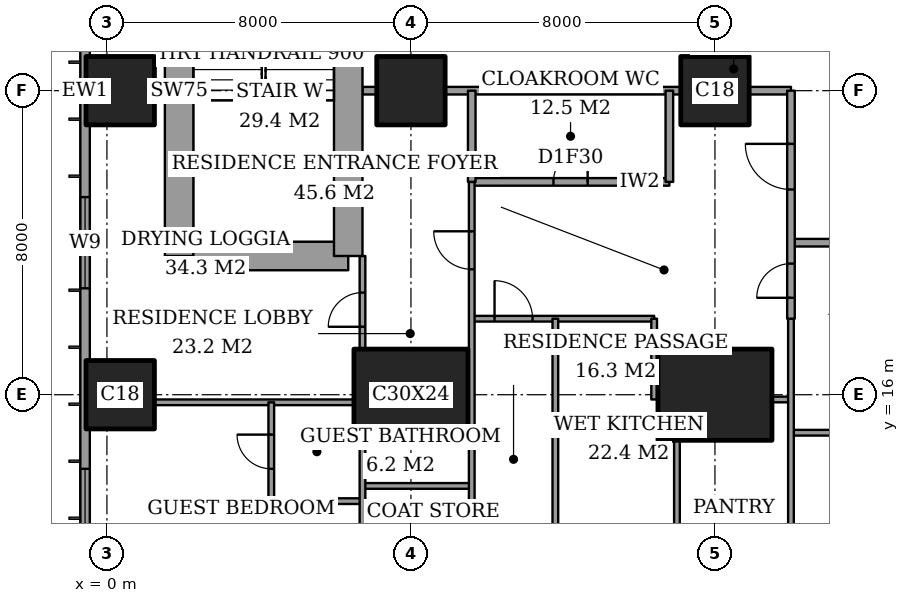
"""IFC4 building model, lengths in metres.
Left out: names, types, materials, properties, quantities, classifications, styles, units other than length and angle.
Written with IfcOpenShell. Run it as: python <this file> out.ifc"""

import sys

from ifc_helpers import new_model, si_unit, direction, frame, frame_2d, origin, origin_2d, place, context, subcontext, project, spatial, rectangle, extrude, element, fill, save


model = new_model("IFC4")
c1 = context("Model", 3, precision=1e-05, world=origin(), true_north=direction((0.0, 1.0)))
c2 = subcontext(c1, "Body", "Model", "MODEL_VIEW")
j1 = project(units=[si_unit("LENGTHUNIT", "METRE"), si_unit("PLANEANGLEUNIT", "RADIAN")], contexts=[c1])
p1 = place(None, origin())
s1 = spatial("IfcSite", under=j1, at=p1, CompositionType="ELEMENT")
p2 = place(p1, origin())
s2 = spatial("IfcBuilding", under=s1, at=p2, CompositionType="ELEMENT")
p3 = place(p2, frame((0.0, 0.0, 193.0)))
s3 = spatial("IfcBuildingStorey", under=s2, at=p3, CompositionType="ELEMENT", Elevation=193.0)
for number, where, z_axis, x_axis in (
    (1, (0.35, 16.0, 0.0), (0.0, 0.0, 1.0), (1.0, 0.0, 0.0)),
    (2, (0.35, 24.0, 0.0), (0.0, 0.0, 1.0), (1.0, 0.0, 0.0)),
):
    element("IfcColumn", number, at=place(p3, frame(where, z_axis=z_axis, x_axis=x_axis)), inside=s3, PredefinedType="COLUMN", context=c2, shape_type="SweptSolid", body=[
        extrude(rectangle(XDim=1.8, YDim=1.8, at=origin_2d()), origin(), (0.0, 0.0, 1.0), 3.6),
    ])
p4 = place(p3, frame((8.0, 16.0, 0.0), z_axis=(0.0, 0.0, 1.0), x_axis=(1.0, 0.0, 0.0)))
e3 = element("IfcColumn", 3, at=p4, inside=s3, PredefinedType="COLUMN", context=c2, shape_type="SweptSolid", body=[
    extrude(rectangle(XDim=3.0, YDim=2.4, at=origin_2d()), origin(), (0.0, 0.0, 1.0), 3.6),
])
p5 = place(p3, frame((8.0, 24.0, 0.0), z_axis=(0.0, 0.0, 1.0), x_axis=(1.0, 0.0, 0.0)))
e4 = element("IfcColumn", 4, at=p5, inside=s3, PredefinedType="COLUMN", context=c2, shape_type="SweptSolid", body=[
    extrude(rectangle(XDim=1.8, YDim=1.8, at=origin_2d()), origin(), (0.0, 0.0, 1.0), 3.6),
])
p6 = place(p3, frame((16.0, 16.0, 0.0), z_axis=(0.0, 0.0, 1.0), x_axis=(1.0, 0.0, 0.0)))
e5 = element("IfcColumn", 5, at=p6, inside=s3, PredefinedType="COLUMN", context=c2, shape_type="SweptSolid", body=[
    extrude(rectangle(XDim=3.0, YDim=2.4, at=origin_2d()), origin(), (0.0, 0.0, 1.0), 3.6),
])
p7 = place(p3, frame((16.0, 24.0, 0.0), z_axis=(0.0, 0.0, 1.0), x_axis=(1.0, 0.0, 0.0)))
e6 = element("IfcColumn", 6, at=p7, inside=s3, PredefinedType="COLUMN", context=c2, shape_type="SweptSolid", body=[
    extrude(rectangle(XDim=1.8, YDim=1.8, at=origin_2d()), origin(), (0.0, 0.0, 1.0), 3.6),
])
p8 = place(p3, frame((1.9, 19.65, 0.0), z_axis=(0.0, 0.0, 1.0), x_axis=(1.0, 0.0, 0.0)))
e7 = element("IfcWall", 7, at=p8, inside=s3, PredefinedType="SHEAR", context=c2, shape_type="SweptSolid", body=[
    extrude(rectangle(XDim=4.45, YDim=0.75, at=frame_2d((2.225, 0.0))), origin(), (0.0, 0.0, 1.0), 3.6),
])
p9 = place(p3, frame((6.35, 19.65, 0.0), z_axis=(0.0, 0.0, 1.0), x_axis=(0.0, 1.0, 0.0)))
e8 = element("IfcWall", 8, at=p9, inside=s3, PredefinedType="SHEAR", context=c2, shape_type="SweptSolid", body=[
    extrude(rectangle(XDim=8.7, YDim=0.75, at=frame_2d((4.35, 0.0))), origin(), (0.0, 0.0, 1.0), 3.6),
])
p10 = place(p9, frame((6.725, 0.0, 0.0)))
e9 = element("IfcOpeningElement", 9, at=p10, cuts=e8, PredefinedType="OPENING", context=c2, shape_type="SweptSolid", body=[
    extrude(rectangle(XDim=1.0, YDim=2.1, at=frame_2d((0.5, 1.05))), frame((0.0, 0.385, 0.0), z_axis=(0.0, -1.0, 0.0), x_axis=(1.0, 0.0, 0.0)), (0.0, 0.0, 1.0), 0.77),
])
p11 = place(p3, frame((1.9, 28.35, 0.0), z_axis=(0.0, 0.0, 1.0), x_axis=(0.0, -1.0, 0.0)))
e10 = element("IfcWall", 10, at=p11, inside=s3, PredefinedType="SHEAR", context=c2, shape_type="SweptSolid", body=[
    extrude(rectangle(XDim=8.7, YDim=0.75, at=frame_2d((4.35, 0.0))), origin(), (0.0, 0.0, 1.0), 3.6),
])
p12 = place(p3, frame((-0.575, 44.825, 0.0), z_axis=(0.0, 0.0, 1.0), x_axis=(0.0, -1.0, 0.0)))
e11 = element("IfcWall", 11, at=p12, inside=s3, PredefinedType="SOLIDWALL", context=c2, shape_type="SweptSolid", body=[
    extrude(rectangle(XDim=41.65, YDim=0.25, at=frame_2d((20.825, 0.0))), origin(), (0.0, 0.0, 1.0), 3.6),
])
p13 = place(p12, frame((0.825, 0.0, 0.2)))
e12 = element("IfcOpeningElement", 12, at=p13, cuts=e11, PredefinedType="OPENING", context=c2, shape_type="SweptSolid", body=[
    extrude(rectangle(XDim=2.4, YDim=2.4, at=frame_2d((1.2, 1.2))), frame((0.0, 0.135, 0.0), z_axis=(0.0, -1.0, 0.0), x_axis=(1.0, 0.0, 0.0)), (0.0, 0.0, 1.0), 0.27),
])
p14 = place(p12, frame((6.05, 0.0, 0.2)))
e13 = element("IfcOpeningElement", 13, at=p14, cuts=e11, PredefinedType="OPENING", context=c2, shape_type="SweptSolid", body=[
    extrude(rectangle(XDim=1.2, YDim=2.4, at=frame_2d((0.6, 1.2))), frame((0.0, 0.135, 0.0), z_axis=(0.0, -1.0, 0.0), x_axis=(1.0, 0.0, 0.0)), (0.0, 0.0, 1.0), 0.27),
])
p15 = place(p12, frame((8.225, 0.0, 0.2)))
e14 = element("IfcOpeningElement", 14, at=p15, cuts=e11, PredefinedType="OPENING", context=c2, shape_type="SweptSolid", body=[
    extrude(rectangle(XDim=2.4, YDim=2.4, at=frame_2d((1.2, 1.2))), frame((0.0, 0.135, 0.0), z_axis=(0.0, -1.0, 0.0), x_axis=(1.0, 0.0, 0.0)), (0.0, 0.0, 1.0), 0.27),
])
p16 = place(p12, frame((15.625, 0.0, 0.2)))
e15 = element("IfcOpeningElement", 15, at=p16, cuts=e11, PredefinedType="OPENING", context=c2, shape_type="SweptSolid", body=[
    extrude(rectangle(XDim=2.4, YDim=2.4, at=frame_2d((1.2, 1.2))), frame((0.0, 0.135, 0.0), z_axis=(0.0, -1.0, 0.0), x_axis=(1.0, 0.0, 0.0)), (0.0, 0.0, 1.0), 0.27),
])
p17 = place(p12, frame((23.625, 0.0, 0.2)))
e16 = element("IfcOpeningElement", 16, at=p17, cuts=e11, PredefinedType="OPENING", context=c2, shape_type="SweptSolid", body=[
    extrude(rectangle(XDim=2.4, YDim=2.4, at=frame_2d((1.2, 1.2))), frame((0.0, 0.135, 0.0), z_axis=(0.0, -1.0, 0.0), x_axis=(1.0, 0.0, 0.0)), (0.0, 0.0, 1.0), 0.27),
])
p18 = place(p12, frame((30.775, 0.0, 0.2)))
e17 = element("IfcOpeningElement", 17, at=p18, cuts=e11, PredefinedType="OPENING", context=c2, shape_type="SweptSolid", body=[
    extrude(rectangle(XDim=2.4, YDim=2.4, at=frame_2d((1.2, 1.2))), frame((0.0, 0.135, 0.0), z_axis=(0.0, -1.0, 0.0), x_axis=(1.0, 0.0, 0.0)), (0.0, 0.0, 1.0), 0.27),
])
p19 = place(p12, frame((34.55, 0.0, 0.2)))
e18 = element("IfcOpeningElement", 18, at=p19, cuts=e11, PredefinedType="OPENING", context=c2, shape_type="SweptSolid", body=[
    extrude(rectangle(XDim=1.2, YDim=2.4, at=frame_2d((0.6, 1.2))), frame((0.0, 0.135, 0.0), z_axis=(0.0, -1.0, 0.0), x_axis=(1.0, 0.0, 0.0)), (0.0, 0.0, 1.0), 0.27),
])
p20 = place(p12, frame((38.425, 0.0, 0.2)))
e19 = element("IfcOpeningElement", 19, at=p20, cuts=e11, PredefinedType="OPENING", context=c2, shape_type="SweptSolid", body=[
    extrude(rectangle(XDim=2.4, YDim=2.4, at=frame_2d((1.2, 1.2))), frame((0.0, 0.135, 0.0), z_axis=(0.0, -1.0, 0.0), x_axis=(1.0, 0.0, 0.0)), (0.0, 0.0, 1.0), 0.27),
])
p21 = place(p3, frame((4.325, 13.2, 0.0), z_axis=(0.0, 0.0, 1.0), x_axis=(1.0, 0.0, 0.0)))
e20 = element("IfcWall", 20, at=p21, inside=s3, PredefinedType="PARTITIONING", context=c2, shape_type="SweptSolid", body=[
    extrude(rectangle(XDim=2.4, YDim=0.15, at=frame_2d((1.2, 0.0))), origin(), (0.0, 0.0, 1.0), 3.35),
])
p22 = place(p3, frame((6.725, 13.6, 0.0), z_axis=(0.0, 0.0, 1.0), x_axis=(1.0, 0.0, 0.0)))
e21 = element("IfcWall", 21, at=p22, inside=s3, PredefinedType="PARTITIONING", context=c2, shape_type="SweptSolid", body=[
    extrude(rectangle(XDim=2.875, YDim=0.15, at=frame_2d((1.438, 0.0))), origin(), (0.0, 0.0, 1.0), 3.35),
])
p23 = place(p3, frame((18.0, 15.0, 0.0), z_axis=(0.0, 0.0, 1.0), x_axis=(1.0, 0.0, 0.0)))
e22 = element("IfcWall", 22, at=p23, inside=s3, PredefinedType="PARTITIONING", context=c2, shape_type="SweptSolid", body=[
    extrude(rectangle(XDim=6.0, YDim=0.15, at=frame_2d((3.0, 0.0))), origin(), (0.0, 0.0, 1.0), 3.35),
])
p24 = place(p3, frame((1.25, 15.8, 0.0), z_axis=(0.0, 0.0, 1.0), x_axis=(1.0, 0.0, 0.0)))
e23 = element("IfcWall", 23, at=p24, inside=s3, PredefinedType="PARTITIONING", context=c2, shape_type="SweptSolid", body=[
    extrude(rectangle(XDim=5.25, YDim=0.15, at=frame_2d((2.625, 0.0))), origin(), (0.0, 0.0, 1.0), 3.35),
])
p25 = place(p3, frame((17.5, 15.875, 0.0), z_axis=(0.0, 0.0, 1.0), x_axis=(1.0, 0.0, 0.0)))
e24 = element("IfcWall", 24, at=p25, inside=s3, PredefinedType="PARTITIONING", context=c2, shape_type="SweptSolid", body=[
    extrude(rectangle(XDim=0.5, YDim=0.15, at=frame_2d((0.25, 0.0))), origin(), (0.0, 0.0, 1.0), 2.634),
])
p26 = place(p3, frame((9.6, 18.0, 0.0), z_axis=(0.0, 0.0, 1.0), x_axis=(1.0, 0.0, 0.0)))
e25 = element("IfcWall", 25, at=p26, inside=s3, PredefinedType="PARTITIONING", context=c2, shape_type="SweptSolid", body=[
    extrude(rectangle(XDim=4.8, YDim=0.15, at=frame_2d((2.4, 0.0))), origin(), (0.0, 0.0, 1.0), 3.35),
])
p27 = place(p26, frame((0.6, 0.0, 0.0)))
e26 = element("IfcOpeningElement", 26, at=p27, cuts=e25, PredefinedType="OPENING", context=c2, shape_type="SweptSolid", body=[
    extrude(rectangle(XDim=1.0, YDim=2.1, at=frame_2d((0.5, 1.05))), frame((0.0, 0.085, 0.0), z_axis=(0.0, -1.0, 0.0), x_axis=(1.0, 0.0, 0.0)), (0.0, 0.0, 1.0), 0.17),
])
p28 = place(p3, frame((18.0, 20.0, 0.0), z_axis=(0.0, 0.0, 1.0), x_axis=(1.0, 0.0, 0.0)))
e27 = element("IfcWall", 27, at=p28, inside=s3, PredefinedType="PARTITIONING", context=c2, shape_type="SweptSolid", body=[
    extrude(rectangle(XDim=6.0, YDim=0.2, at=frame_2d((3.0, 0.0))), origin(), (0.0, 0.0, 1.0), 3.35),
])
p29 = place(p3, frame((9.6, 21.6, 0.0), z_axis=(0.0, 0.0, 1.0), x_axis=(1.0, 0.0, 0.0)))
e28 = element("IfcWall", 28, at=p29, inside=s3, PredefinedType="PARTITIONING", context=c2, shape_type="SweptSolid", body=[
    extrude(rectangle(XDim=5.2, YDim=0.2, at=frame_2d((2.6, 0.0))), origin(), (0.0, 0.0, 1.0), 3.35),
])
p30 = place(p29, frame((2.15, 0.0, 0.0)))
e29 = element("IfcOpeningElement", 29, at=p30, cuts=e28, PredefinedType="OPENING", context=c2, shape_type="SweptSolid", body=[
    extrude(rectangle(XDim=0.9, YDim=2.1, at=frame_2d((0.45, 1.05))), frame((0.0, 0.11, 0.0), z_axis=(0.0, -1.0, 0.0), x_axis=(1.0, 0.0, 0.0)), (0.0, 0.0, 1.0), 0.22),
])
p31 = place(p3, frame((6.725, 24.0, 0.0), z_axis=(0.0, 0.0, 1.0), x_axis=(1.0, 0.0, 0.0)))
e30 = element("IfcWall", 30, at=p31, inside=s3, PredefinedType="PARTITIONING", context=c2, shape_type="SweptSolid", body=[
    extrude(rectangle(XDim=0.375, YDim=0.2, at=frame_2d((0.188, 0.0))), origin(), (0.0, 0.0, 1.0), 3.35),
])
p32 = place(p3, frame((8.9, 24.0, 0.0), z_axis=(0.0, 0.0, 1.0), x_axis=(1.0, 0.0, 0.0)))
e31 = element("IfcWall", 31, at=p32, inside=s3, PredefinedType="PARTITIONING", context=c2, shape_type="SweptSolid", body=[
    extrude(rectangle(XDim=6.2, YDim=0.2, at=frame_2d((3.1, 0.0))), origin(), (0.0, 0.0, 1.0), 3.35),
])
p33 = place(p3, frame((16.9, 24.0, 0.0), z_axis=(0.0, 0.0, 1.0), x_axis=(1.0, 0.0, 0.0)))
e32 = element("IfcWall", 32, at=p33, inside=s3, PredefinedType="PARTITIONING", context=c2, shape_type="SweptSolid", body=[
    extrude(rectangle(XDim=1.1, YDim=0.2, at=frame_2d((0.55, 0.0))), origin(), (0.0, 0.0, 1.0), 3.35),
])
p34 = place(p3, frame((4.325, 13.2, 0.0), z_axis=(0.0, 0.0, 1.0), x_axis=(0.0, 1.0, 0.0)))
e33 = element("IfcWall", 33, at=p34, inside=s3, PredefinedType="PARTITIONING", context=c2, shape_type="SweptSolid", body=[
    extrude(rectangle(XDim=2.6, YDim=0.15, at=frame_2d((1.3, 0.0))), origin(), (0.0, 0.0, 1.0), 3.35),
])
p35 = place(p34, frame((0.85, 0.0, 0.0)))
e34 = element("IfcOpeningElement", 34, at=p35, cuts=e33, PredefinedType="OPENING", context=c2, shape_type="SweptSolid", body=[
    extrude(rectangle(XDim=0.9, YDim=2.1, at=frame_2d((0.45, 1.05))), frame((0.0, 0.085, 0.0), z_axis=(0.0, -1.0, 0.0), x_axis=(1.0, 0.0, 0.0)), (0.0, 0.0, 1.0), 0.17),
])
p36 = place(p3, frame((6.725, 10.6, 0.0), z_axis=(0.0, 0.0, 1.0), x_axis=(0.0, 1.0, 0.0)))
e35 = element("IfcWall", 35, at=p36, inside=s3, PredefinedType="PARTITIONING", context=c2, shape_type="SweptSolid", body=[
    extrude(rectangle(XDim=4.2, YDim=0.15, at=frame_2d((2.1, 0.0))), origin(), (0.0, 0.0, 1.0), 3.35),
])
p37 = place(p3, frame((6.725, 17.2, 0.0), z_axis=(0.0, 0.0, 1.0), x_axis=(0.0, 1.0, 0.0)))
e36 = element("IfcWall", 36, at=p37, inside=s3, PredefinedType="PARTITIONING", context=c2, shape_type="SweptSolid", body=[
    extrude(rectangle(XDim=2.45, YDim=0.15, at=frame_2d((1.225, 0.0))), origin(), (0.0, 0.0, 1.0), 3.35),
])
p38 = place(p37, frame((0.587, 0.0, 0.0)))
e37 = element("IfcOpeningElement", 37, at=p38, cuts=e36, PredefinedType="OPENING", context=c2, shape_type="SweptSolid", body=[
    extrude(rectangle(XDim=0.9, YDim=2.1, at=frame_2d((0.45, 1.05))), frame((0.0, 0.085, 0.0), z_axis=(0.0, -1.0, 0.0), x_axis=(1.0, 0.0, 0.0)), (0.0, 0.0, 1.0), 0.17),
])
p39 = place(p3, frame((9.6, 21.6, 0.0), z_axis=(0.0, 0.0, 1.0), x_axis=(0.0, 1.0, 0.0)))
e38 = element("IfcWall", 38, at=p39, inside=s3, PredefinedType="PARTITIONING", context=c2, shape_type="SweptSolid", body=[
    extrude(rectangle(XDim=2.4, YDim=0.2, at=frame_2d((1.2, 0.0))), origin(), (0.0, 0.0, 1.0), 3.35),
])
p40 = place(p3, frame((9.6, 10.6, 0.0), z_axis=(0.0, 0.0, 1.0), x_axis=(0.0, 1.0, 0.0)))
e39 = element("IfcWall", 39, at=p40, inside=s3, PredefinedType="PARTITIONING", context=c2, shape_type="SweptSolid", body=[
    extrude(rectangle(XDim=11.0, YDim=0.15, at=frame_2d((5.5, 0.0))), origin(), (0.0, 0.0, 1.0), 3.35),
])
p41 = place(p40, frame((8.7, 0.0, 0.0)))
e40 = element("IfcOpeningElement", 40, at=p41, cuts=e39, PredefinedType="OPENING", context=c2, shape_type="SweptSolid", body=[
    extrude(rectangle(XDim=1.0, YDim=2.1, at=frame_2d((0.5, 1.05))), frame((0.0, 0.085, 0.0), z_axis=(0.0, -1.0, 0.0), x_axis=(1.0, 0.0, 0.0)), (0.0, 0.0, 1.0), 0.17),
])
p42 = place(p3, frame((11.8, 10.6, 0.0), z_axis=(0.0, 0.0, 1.0), x_axis=(0.0, 1.0, 0.0)))
e41 = element("IfcWall", 41, at=p42, inside=s3, PredefinedType="PARTITIONING", context=c2, shape_type="SweptSolid", body=[
    extrude(rectangle(XDim=7.4, YDim=0.15, at=frame_2d((3.7, 0.0))), origin(), (0.0, 0.0, 1.0), 3.35),
])
p43 = place(p3, frame((14.4, 15.875, 0.0), z_axis=(0.0, 0.0, 1.0), x_axis=(0.0, 1.0, 0.0)))
e42 = element("IfcWall", 42, at=p43, inside=s3, PredefinedType="PARTITIONING", context=c2, shape_type="SweptSolid", body=[
    extrude(rectangle(XDim=2.125, YDim=0.15, at=frame_2d((1.062, 0.0))), origin(), (0.0, 0.0, 1.0), 3.35),
])
p44 = place(p3, frame((14.8, 21.6, 0.0), z_axis=(0.0, 0.0, 1.0), x_axis=(0.0, 1.0, 0.0)))
e43 = element("IfcWall", 43, at=p44, inside=s3, PredefinedType="PARTITIONING", context=c2, shape_type="SweptSolid", body=[
    extrude(rectangle(XDim=2.4, YDim=0.2, at=frame_2d((1.2, 0.0))), origin(), (0.0, 0.0, 1.0), 3.35),
])
p45 = place(p3, frame((15.0, 10.6, 0.0), z_axis=(0.0, 0.0, 1.0), x_axis=(0.0, 1.0, 0.0)))
e44 = element("IfcWall", 44, at=p45, inside=s3, PredefinedType="PARTITIONING", context=c2, shape_type="SweptSolid", body=[
    extrude(rectangle(XDim=4.2, YDim=0.15, at=frame_2d((2.1, 0.0))), origin(), (0.0, 0.0, 1.0), 3.35),
])
p46 = place(p3, frame((18.0, 18.0, 0.0), z_axis=(0.0, 0.0, 1.0), x_axis=(0.0, 1.0, 0.0)))
e45 = element("IfcWall", 45, at=p46, inside=s3, PredefinedType="PARTITIONING", context=c2, shape_type="SweptSolid", body=[
    extrude(rectangle(XDim=6.0, YDim=0.2, at=frame_2d((3.0, 0.0))), origin(), (0.0, 0.0, 1.0), 3.35),
])
p47 = place(p46, frame((3.4, 0.0, 0.0)))
e46 = element("IfcOpeningElement", 46, at=p47, cuts=e45, PredefinedType="OPENING", context=c2, shape_type="SweptSolid", body=[
    extrude(rectangle(XDim=1.2, YDim=2.4, at=frame_2d((0.6, 1.2))), frame((0.0, 0.11, 0.0), z_axis=(0.0, -1.0, 0.0), x_axis=(1.0, 0.0, 0.0)), (0.0, 0.0, 1.0), 0.22),
])
p48 = place(p46, frame((0.55, 0.0, 0.0)))
e47 = element("IfcOpeningElement", 47, at=p48, cuts=e45, PredefinedType="OPENING", context=c2, shape_type="SweptSolid", body=[
    extrude(rectangle(XDim=0.9, YDim=2.1, at=frame_2d((0.45, 1.05))), frame((0.0, 0.11, 0.0), z_axis=(0.0, -1.0, 0.0), x_axis=(1.0, 0.0, 0.0)), (0.0, 0.0, 1.0), 0.22),
])
p49 = place(p3, frame((18.0, 10.6, 0.0), z_axis=(0.0, 0.0, 1.0), x_axis=(0.0, 1.0, 0.0)))
e48 = element("IfcWall", 48, at=p49, inside=s3, PredefinedType="PARTITIONING", context=c2, shape_type="SweptSolid", body=[
    extrude(rectangle(XDim=7.4, YDim=0.15, at=frame_2d((3.7, 0.0))), origin(), (0.0, 0.0, 1.0), 3.35),
])
p50 = place(p17, origin())
e49 = element("IfcWindow", 49, at=p50, inside=s3, PartitioningType="SINGLE_PANEL", PredefinedType="WINDOW", context=c2, shape_type="SweptSolid", body=[
    extrude(rectangle(XDim=2.4, YDim=2.4, at=frame_2d((1.2, 1.2))), frame((0.0, 0.03, 0.0), z_axis=(0.0, -1.0, 0.0), x_axis=(1.0, 0.0, 0.0)), (0.0, 0.0, 1.0), 0.06),
])
fill(e16, e49)
p51 = place(p18, origin())
e50 = element("IfcWindow", 50, at=p51, inside=s3, PartitioningType="SINGLE_PANEL", PredefinedType="WINDOW", context=c2, shape_type="SweptSolid", body=[
    extrude(rectangle(XDim=2.4, YDim=2.4, at=frame_2d((1.2, 1.2))), frame((0.0, 0.03, 0.0), z_axis=(0.0, -1.0, 0.0), x_axis=(1.0, 0.0, 0.0)), (0.0, 0.0, 1.0), 0.06),
])
fill(e17, e50)
p52 = place(p35, origin())
e51 = element("IfcDoor", 51, at=p52, inside=s3, OperationType="SINGLE_SWING_LEFT", PredefinedType="DOOR", context=c2, shape_type="SweptSolid", body=[
    extrude(rectangle(XDim=0.9, YDim=2.1, at=frame_2d((0.45, 1.05))), frame((0.0, 0.025, 0.0), z_axis=(0.0, -1.0, 0.0), x_axis=(1.0, 0.0, 0.0)), (0.0, 0.0, 1.0), 0.05),
])
fill(e34, e51)
p53 = place(p38, origin())
e52 = element("IfcDoor", 52, at=p53, inside=s3, OperationType="SINGLE_SWING_RIGHT", PredefinedType="DOOR", context=c2, shape_type="SweptSolid", body=[
    extrude(rectangle(XDim=0.9, YDim=2.1, at=frame_2d((0.45, 1.05))), frame((0.0, 0.025, 0.0), z_axis=(0.0, -1.0, 0.0), x_axis=(1.0, 0.0, 0.0)), (0.0, 0.0, 1.0), 0.05),
])
fill(e37, e52)
p54 = place(p41, origin())
e53 = element("IfcDoor", 53, at=p54, inside=s3, OperationType="SINGLE_SWING_LEFT", PredefinedType="DOOR", context=c2, shape_type="SweptSolid", body=[
    extrude(rectangle(XDim=1.0, YDim=2.1, at=frame_2d((0.5, 1.05))), frame((0.0, 0.025, 0.0), z_axis=(0.0, -1.0, 0.0), x_axis=(1.0, 0.0, 0.0)), (0.0, 0.0, 1.0), 0.05),
])
fill(e40, e53)
p55 = place(p30, origin())
e54 = element("IfcDoor", 54, at=p55, inside=s3, OperationType="SINGLE_SWING_LEFT", PredefinedType="DOOR", context=c2, shape_type="SweptSolid", body=[
    extrude(rectangle(XDim=0.9, YDim=2.1, at=frame_2d((0.45, 1.05))), frame((0.0, 0.025, 0.0), z_axis=(0.0, -1.0, 0.0), x_axis=(1.0, 0.0, 0.0)), (0.0, 0.0, 1.0), 0.05),
])
fill(e29, e54)
p56 = place(p47, origin())
e55 = element("IfcDoor", 55, at=p56, inside=s3, OperationType="SINGLE_SWING_LEFT", PredefinedType="DOOR", context=c2, shape_type="SweptSolid", body=[
    extrude(rectangle(XDim=1.2, YDim=2.4, at=frame_2d((0.6, 1.2))), frame((0.0, 0.025, 0.0), z_axis=(0.0, -1.0, 0.0), x_axis=(1.0, 0.0, 0.0)), (0.0, 0.0, 1.0), 0.05),
])
fill(e46, e55)
p57 = place(p27, origin())
e56 = element("IfcDoor", 56, at=p57, inside=s3, OperationType="SINGLE_SWING_RIGHT", PredefinedType="DOOR", context=c2, shape_type="SweptSolid", body=[
    extrude(rectangle(XDim=1.0, YDim=2.1, at=frame_2d((0.5, 1.05))), frame((0.0, 0.025, 0.0), z_axis=(0.0, -1.0, 0.0), x_axis=(1.0, 0.0, 0.0)), (0.0, 0.0, 1.0), 0.05),
])
fill(e26, e56)
p58 = place(p48, origin())
e57 = element("IfcDoor", 57, at=p58, inside=s3, OperationType="SINGLE_SWING_RIGHT", PredefinedType="DOOR", context=c2, shape_type="SweptSolid", body=[
    extrude(rectangle(XDim=0.9, YDim=2.1, at=frame_2d((0.45, 1.05))), frame((0.0, 0.025, 0.0), z_axis=(0.0, -1.0, 0.0), x_axis=(1.0, 0.0, 0.0)), (0.0, 0.0, 1.0), 0.05),
])
fill(e47, e57)
save(model, sys.argv[1])
